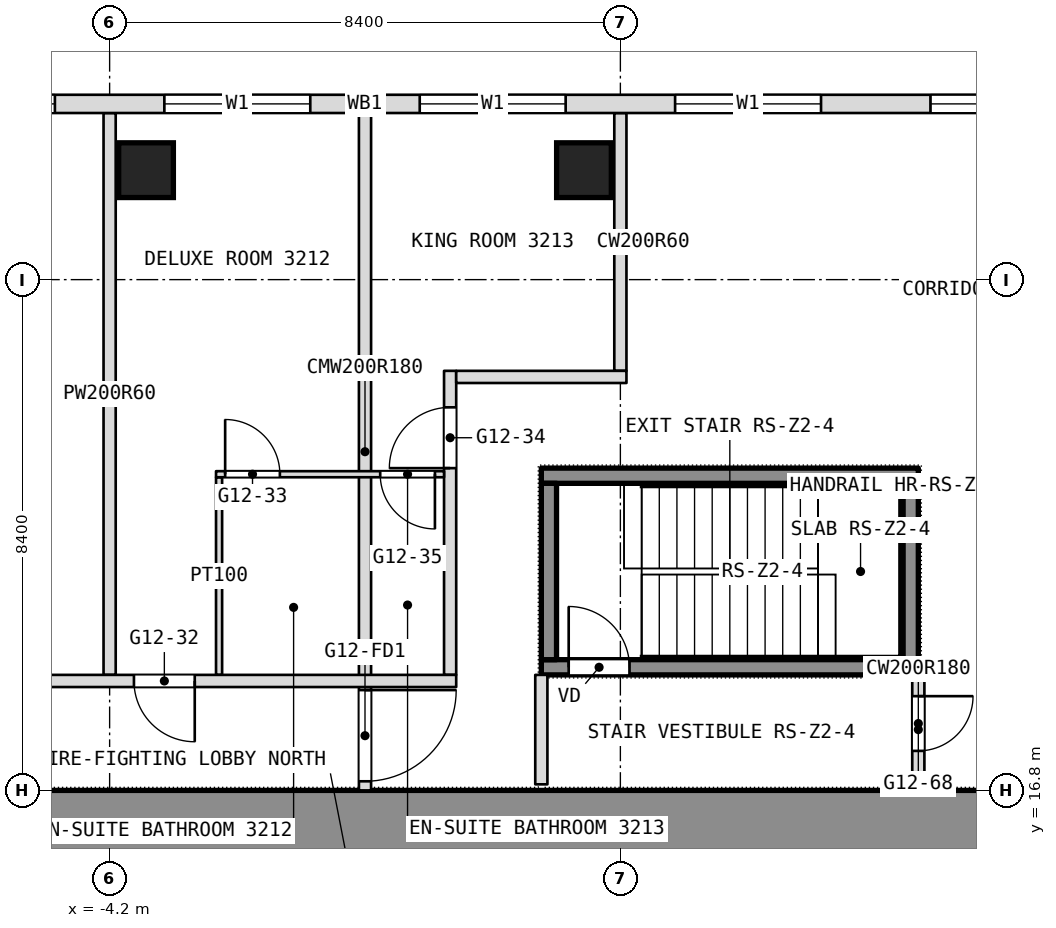
"""IFC4 building model, lengths in metres.
Left out: names, types, materials, properties, quantities, classifications, styles, units other than length and angle.
Written with IfcOpenShell. Run it as: python <this file> out.ifc"""

import sys

from ifc_helpers import new_model, si_unit, direction, frame, frame_2d, origin, origin_2d, place, context, subcontext, project, spatial, rectangle, extrude, element, fill, save


model = new_model("IFC4")
c1 = context("Model", 3, precision=1e-05, world=origin(), true_north=direction((0.0, 1.0)))
c2 = subcontext(c1, "Body", "Model", "MODEL_VIEW")
j1 = project(units=[si_unit("LENGTHUNIT", "METRE"), si_unit("PLANEANGLEUNIT", "RADIAN")], contexts=[c1])
p1 = place(None, origin())
s1 = spatial("IfcSite", under=j1, at=p1, CompositionType="ELEMENT")
p2 = place(p1, origin())
s2 = spatial("IfcBuilding", under=s1, at=p2, CompositionType="ELEMENT")
p3 = place(p2, frame((0.0, 0.0, 140.9)))
s3 = spatial("IfcBuildingStorey", under=s2, at=p3, CompositionType="ELEMENT", Elevation=140.9)
p4 = place(p3, frame((-11.1, 16.3, 0.0), z_axis=(0.0, 0.0, 1.0), x_axis=(1.0, 0.0, 0.0)))
e1 = element("IfcWall", 1, at=p4, inside=s3, PredefinedType="SHEAR", context=c2, shape_type="SweptSolid", body=[
    extrude(rectangle(XDim=22.2, YDim=1.0, at=frame_2d((11.1, 0.0))), origin(), (0.0, 0.0, 1.0), 3.6),
])
for number, where, z_axis, x_axis in (
    (2, (-3.601, 27.0, 0.0), (0.0, 0.0, 1.0), (1.0, 0.0, 0.0)),
    (3, (3.601, 27.0, 0.0), (0.0, 0.0, 1.0), (1.0, 0.0, 0.0)),
):
    element("IfcColumn", number, at=place(p3, frame(where, z_axis=z_axis, x_axis=x_axis)), inside=s3, PredefinedType="COLUMN", context=c2, shape_type="SweptSolid", body=[
        extrude(rectangle(XDim=0.9, YDim=0.9, at=origin_2d()), origin(), (0.0, 0.0, 1.0), 3.6),
    ])
p5 = place(p3, frame((9.1, 16.9, 0.0), z_axis=(0.0, 0.0, 1.0), x_axis=(0.0, 1.0, 0.0)))
e4 = element("IfcWall", 4, at=p5, inside=s3, PredefinedType="PARTITIONING", context=c2, shape_type="SweptSolid", body=[
    extrude(rectangle(XDim=1.8, YDim=0.2, at=frame_2d((0.9, 0.0))), origin(), (0.0, 0.0, 1.0), 3.34),
])
p6 = place(p5, frame((0.55, 0.0, 0.0)))
e5 = element("IfcOpeningElement", 5, at=p6, cuts=e4, PredefinedType="OPENING", context=c2, shape_type="SweptSolid", body=[
    extrude(rectangle(XDim=0.9, YDim=2.1, at=frame_2d((0.45, 1.05))), frame((0.0, 0.1, 0.0), z_axis=(0.0, -1.0, 0.0), x_axis=(1.0, 0.0, 0.0)), (0.0, 0.0, 1.0), 0.2),
])
p7 = place(p3, frame((4.2, 23.7, 0.0), z_axis=(0.0, 0.0, 1.0), x_axis=(0.0, 1.0, 0.0)))
e6 = element("IfcWall", 6, at=p7, inside=s3, PredefinedType="PARTITIONING", context=c2, shape_type="SweptSolid", body=[
    extrude(rectangle(XDim=4.24, YDim=0.2, at=frame_2d((2.12, 0.0))), origin(), (0.0, 0.0, 1.0), 3.34),
])
p8 = place(p3, frame((2.9, 16.9, 0.0), z_axis=(0.0, 0.0, 1.0), x_axis=(0.0, 1.0, 0.0)))
e7 = element("IfcWall", 7, at=p8, inside=s3, PredefinedType="PARTITIONING", context=c2, shape_type="SweptSolid", body=[
    extrude(rectangle(XDim=1.8, YDim=0.2, at=frame_2d((0.9, 0.0))), origin(), (0.0, 0.0, 1.0), 3.34),
])
p9 = place(p3, frame((1.4, 18.7, 0.0), z_axis=(0.0, 0.0, 1.0), x_axis=(0.0, 1.0, 0.0)))
e8 = element("IfcWall", 8, at=p9, inside=s3, PredefinedType="PARTITIONING", context=c2, shape_type="SweptSolid", body=[
    extrude(rectangle(XDim=5.0, YDim=0.2, at=frame_2d((2.5, 0.0))), origin(), (0.0, 0.0, 1.0), 3.34),
])
p10 = place(p9, frame((3.4, 0.0, 0.0)))
e9 = element("IfcOpeningElement", 9, at=p10, cuts=e8, PredefinedType="OPENING", context=c2, shape_type="SweptSolid", body=[
    extrude(rectangle(XDim=1.0, YDim=2.1, at=frame_2d((0.5, 1.05))), frame((0.0, 0.1, 0.0), z_axis=(0.0, -1.0, 0.0), x_axis=(1.0, 0.0, 0.0)), (0.0, 0.0, 1.0), 0.2),
])
p11 = place(p3, frame((0.0, 16.8, 0.0), z_axis=(0.0, 0.0, 1.0), x_axis=(0.0, 1.0, 0.0)))
e10 = element("IfcWall", 10, at=p11, inside=s3, PredefinedType="PARTITIONING", context=c2, shape_type="SweptSolid", body=[
    extrude(rectangle(XDim=11.14, YDim=0.2, at=frame_2d((5.57, 0.0))), origin(), (0.0, 0.0, 1.0), 3.34),
])
p12 = place(p11, frame((0.15, 0.0, 0.0)))
e11 = element("IfcOpeningElement", 11, at=p12, cuts=e10, PredefinedType="OPENING", context=c2, shape_type="SweptSolid", body=[
    extrude(rectangle(XDim=1.5, YDim=2.1, at=frame_2d((0.75, 1.05))), frame((0.0, 0.1, 0.0), z_axis=(0.0, -1.0, 0.0), x_axis=(1.0, 0.0, 0.0)), (0.0, 0.0, 1.0), 0.2),
])
p13 = place(p3, frame((-2.4, 18.7, 0.0), z_axis=(0.0, 0.0, 1.0), x_axis=(0.0, 1.0, 0.0)))
e12 = element("IfcWall", 12, at=p13, inside=s3, PredefinedType="PARTITIONING", context=c2, shape_type="SweptSolid", body=[
    extrude(rectangle(XDim=3.25, YDim=0.1, at=frame_2d((1.625, 0.0))), origin(), (0.0, 0.0, 1.0), 3.34),
])
p14 = place(p3, frame((-4.2, 18.7, 0.0), z_axis=(0.0, 0.0, 1.0), x_axis=(0.0, 1.0, 0.0)))
e13 = element("IfcWall", 13, at=p14, inside=s3, PredefinedType="PARTITIONING", context=c2, shape_type="SweptSolid", body=[
    extrude(rectangle(XDim=9.24, YDim=0.2, at=frame_2d((4.62, 0.0))), origin(), (0.0, 0.0, 1.0), 3.34),
])
p15 = place(p3, frame((-16.9, 18.6, 0.0), z_axis=(0.0, 0.0, 1.0), x_axis=(1.0, 0.0, 0.0)))
e14 = element("IfcWall", 14, at=p15, inside=s3, PredefinedType="PARTITIONING", context=c2, shape_type="SweptSolid", body=[
    extrude(rectangle(XDim=18.4, YDim=0.2, at=frame_2d((9.2, 0.0))), origin(), (0.0, 0.0, 1.0), 3.34),
])
p16 = place(p15, frame((0.5, 0.0, 0.0)))
e15 = element("IfcOpeningElement", 15, at=p16, cuts=e14, PredefinedType="OPENING", context=c2, shape_type="SweptSolid", body=[
    extrude(rectangle(XDim=1.0, YDim=2.1, at=frame_2d((0.5, 1.05))), frame((0.0, 0.1, 0.0), z_axis=(0.0, -1.0, 0.0), x_axis=(1.0, 0.0, 0.0)), (0.0, 0.0, 1.0), 0.2),
])
p17 = place(p15, frame((7.6, 0.0, 0.0)))
e16 = element("IfcOpeningElement", 16, at=p17, cuts=e14, PredefinedType="OPENING", context=c2, shape_type="SweptSolid", body=[
    extrude(rectangle(XDim=1.8, YDim=2.1, at=frame_2d((0.9, 1.05))), frame((0.0, 0.1, 0.0), z_axis=(0.0, -1.0, 0.0), x_axis=(1.0, 0.0, 0.0)), (0.0, 0.0, 1.0), 0.2),
])
p18 = place(p15, frame((13.1, 0.0, 0.0)))
e17 = element("IfcOpeningElement", 17, at=p18, cuts=e14, PredefinedType="OPENING", context=c2, shape_type="SweptSolid", body=[
    extrude(rectangle(XDim=1.0, YDim=2.1, at=frame_2d((0.5, 1.05))), frame((0.0, 0.1, 0.0), z_axis=(0.0, -1.0, 0.0), x_axis=(1.0, 0.0, 0.0)), (0.0, 0.0, 1.0), 0.2),
])
p19 = place(p3, frame((-2.45, 22.0, 0.0), z_axis=(0.0, 0.0, 1.0), x_axis=(1.0, 0.0, 0.0)))
e18 = element("IfcWall", 18, at=p19, inside=s3, PredefinedType="PARTITIONING", context=c2, shape_type="SweptSolid", body=[
    extrude(rectangle(XDim=3.75, YDim=0.1, at=frame_2d((1.875, 0.0))), origin(), (0.0, 0.0, 1.0), 3.34),
])
p20 = place(p19, frame((0.15, 0.0, 0.0)))
e19 = element("IfcOpeningElement", 19, at=p20, cuts=e18, PredefinedType="OPENING", context=c2, shape_type="SweptSolid", body=[
    extrude(rectangle(XDim=0.9, YDim=2.1, at=frame_2d((0.45, 1.05))), frame((0.0, 0.05, 0.0), z_axis=(0.0, -1.0, 0.0), x_axis=(1.0, 0.0, 0.0)), (0.0, 0.0, 1.0), 0.1),
])
p21 = place(p19, frame((2.7, 0.0, 0.0)))
e20 = element("IfcOpeningElement", 20, at=p21, cuts=e18, PredefinedType="OPENING", context=c2, shape_type="SweptSolid", body=[
    extrude(rectangle(XDim=0.9, YDim=2.1, at=frame_2d((0.45, 1.05))), frame((0.0, 0.05, 0.0), z_axis=(0.0, -1.0, 0.0), x_axis=(1.0, 0.0, 0.0)), (0.0, 0.0, 1.0), 0.1),
])
p22 = place(p3, frame((1.5, 23.6, 0.0), z_axis=(0.0, 0.0, 1.0), x_axis=(1.0, 0.0, 0.0)))
e21 = element("IfcWall", 21, at=p22, inside=s3, PredefinedType="PARTITIONING", context=c2, shape_type="SweptSolid", body=[
    extrude(rectangle(XDim=2.8, YDim=0.2, at=frame_2d((1.4, 0.0))), origin(), (0.0, 0.0, 1.0), 3.34),
])
p23 = place(p3, frame((21.306, 28.09, 0.0), z_axis=(0.0, 0.0, 1.0), x_axis=(-1.0, 0.0, 0.0)))
e22 = element("IfcWall", 22, at=p23, inside=s3, PredefinedType="NOTDEFINED", context=c2, shape_type="SweptSolid", body=[
    extrude(rectangle(XDim=42.612, YDim=0.3, at=frame_2d((21.306, 0.0))), origin(), (0.0, 0.0, 1.0), 3.6),
])
p24 = place(p23, frame((5.406, 0.0, 0.9)))
e23 = element("IfcOpeningElement", 23, at=p24, cuts=e22, PredefinedType="OPENING", context=c2, shape_type="SweptSolid", body=[
    extrude(rectangle(XDim=2.4, YDim=2.1, at=frame_2d((1.2, 1.05))), frame((0.0, 0.15, 0.0), z_axis=(0.0, -1.0, 0.0), x_axis=(1.0, 0.0, 0.0)), (0.0, 0.0, 1.0), 0.3),
])
p25 = place(p23, frame((9.606, 0.0, 0.9)))
e24 = element("IfcOpeningElement", 24, at=p25, cuts=e22, PredefinedType="OPENING", context=c2, shape_type="SweptSolid", body=[
    extrude(rectangle(XDim=2.4, YDim=2.1, at=frame_2d((1.2, 1.05))), frame((0.0, 0.15, 0.0), z_axis=(0.0, -1.0, 0.0), x_axis=(1.0, 0.0, 0.0)), (0.0, 0.0, 1.0), 0.3),
])
p26 = place(p23, frame((13.806, 0.0, 0.9)))
e25 = element("IfcOpeningElement", 25, at=p26, cuts=e22, PredefinedType="OPENING", context=c2, shape_type="SweptSolid", body=[
    extrude(rectangle(XDim=2.4, YDim=2.1, at=frame_2d((1.2, 1.05))), frame((0.0, 0.15, 0.0), z_axis=(0.0, -1.0, 0.0), x_axis=(1.0, 0.0, 0.0)), (0.0, 0.0, 1.0), 0.3),
])
p27 = place(p23, frame((18.006, 0.0, 0.9)))
e26 = element("IfcOpeningElement", 26, at=p27, cuts=e22, PredefinedType="OPENING", context=c2, shape_type="SweptSolid", body=[
    extrude(rectangle(XDim=2.4, YDim=2.1, at=frame_2d((1.2, 1.05))), frame((0.0, 0.15, 0.0), z_axis=(0.0, -1.0, 0.0), x_axis=(1.0, 0.0, 0.0)), (0.0, 0.0, 1.0), 0.3),
])
p28 = place(p23, frame((22.206, 0.0, 0.9)))
e27 = element("IfcOpeningElement", 27, at=p28, cuts=e22, PredefinedType="OPENING", context=c2, shape_type="SweptSolid", body=[
    extrude(rectangle(XDim=2.4, YDim=2.1, at=frame_2d((1.2, 1.05))), frame((0.0, 0.15, 0.0), z_axis=(0.0, -1.0, 0.0), x_axis=(1.0, 0.0, 0.0)), (0.0, 0.0, 1.0), 0.3),
])
p29 = place(p23, frame((26.406, 0.0, 0.9)))
e28 = element("IfcOpeningElement", 28, at=p29, cuts=e22, PredefinedType="OPENING", context=c2, shape_type="SweptSolid", body=[
    extrude(rectangle(XDim=2.4, YDim=2.1, at=frame_2d((1.2, 1.05))), frame((0.0, 0.15, 0.0), z_axis=(0.0, -1.0, 0.0), x_axis=(1.0, 0.0, 0.0)), (0.0, 0.0, 1.0), 0.3),
])
p30 = place(p23, frame((30.606, 0.0, 0.9)))
e29 = element("IfcOpeningElement", 29, at=p30, cuts=e22, PredefinedType="OPENING", context=c2, shape_type="SweptSolid", body=[
    extrude(rectangle(XDim=2.4, YDim=2.1, at=frame_2d((1.2, 1.05))), frame((0.0, 0.15, 0.0), z_axis=(0.0, -1.0, 0.0), x_axis=(1.0, 0.0, 0.0)), (0.0, 0.0, 1.0), 0.3),
])
p31 = place(p23, frame((34.806, 0.0, 0.9)))
e30 = element("IfcOpeningElement", 30, at=p31, cuts=e22, PredefinedType="OPENING", context=c2, shape_type="SweptSolid", body=[
    extrude(rectangle(XDim=2.4, YDim=2.1, at=frame_2d((1.2, 1.05))), frame((0.0, 0.15, 0.0), z_axis=(0.0, -1.0, 0.0), x_axis=(1.0, 0.0, 0.0)), (0.0, 0.0, 1.0), 0.3),
])
p32 = place(p3, frame((2.9, 18.825, 0.1), z_axis=(0.0, 0.0, 1.0), x_axis=(1.0, 0.0, 0.0)))
e31 = element("IfcWall", 31, at=p32, inside=s3, PredefinedType="SHEAR", context=c2, shape_type="SweptSolid", body=[
    extrude(rectangle(XDim=6.2, YDim=0.25, at=frame_2d((3.1, 0.0))), origin(), (0.0, 0.0, 1.0), 3.6),
])
p33 = place(p32, frame((0.45, 0.0, 0.0)))
e32 = element("IfcOpeningElement", 32, at=p33, cuts=e31, PredefinedType="OPENING", context=c2, shape_type="SweptSolid", body=[
    extrude(rectangle(XDim=1.0, YDim=2.1, at=frame_2d((0.5, 1.05))), frame((0.0, 0.125, 0.0), z_axis=(0.0, -1.0, 0.0), x_axis=(1.0, 0.0, 0.0)), (0.0, 0.0, 1.0), 0.25),
])
p34 = place(p3, frame((2.9, 21.975, 0.1), z_axis=(0.0, 0.0, 1.0), x_axis=(1.0, 0.0, 0.0)))
e33 = element("IfcWall", 33, at=p34, inside=s3, PredefinedType="SHEAR", context=c2, shape_type="SweptSolid", body=[
    extrude(rectangle(XDim=6.2, YDim=0.25, at=frame_2d((3.1, 0.0))), origin(), (0.0, 0.0, 1.0), 3.6),
])
for number, where, z_axis, x_axis in (
    (34, (3.025, 18.95, 0.1), (0.0, 0.0, 1.0), (0.0, 1.0, 0.0)),
    (35, (8.975, 18.95, 0.1), (0.0, 0.0, 1.0), (0.0, 1.0, 0.0)),
):
    element("IfcWall", number, at=place(p3, frame(where, z_axis=z_axis, x_axis=x_axis)), inside=s3, PredefinedType="SHEAR", context=c2, shape_type="SweptSolid", body=[
        extrude(rectangle(XDim=2.9, YDim=0.25, at=frame_2d((1.45, 0.0))), origin(), (0.0, 0.0, 1.0), 3.6),
    ])
p35 = place(p6, origin())
e36 = element("IfcDoor", 36, at=p35, inside=s3, OperationType="SINGLE_SWING_RIGHT", PredefinedType="DOOR", context=c2, shape_type="SweptSolid", body=[
    extrude(rectangle(XDim=0.9, YDim=2.1, at=frame_2d((0.45, 1.05))), frame((0.0, 0.025, 0.0), z_axis=(0.0, -1.0, 0.0), x_axis=(1.0, 0.0, 0.0)), (0.0, 0.0, 1.0), 0.05),
])
fill(e5, e36)
p36 = place(p10, origin())
e37 = element("IfcDoor", 37, at=p36, inside=s3, OperationType="SINGLE_SWING_RIGHT", PredefinedType="DOOR", context=c2, shape_type="SweptSolid", body=[
    extrude(rectangle(XDim=1.0, YDim=2.1, at=frame_2d((0.5, 1.05))), frame((0.0, 0.025, 0.0), z_axis=(0.0, -1.0, 0.0), x_axis=(1.0, 0.0, 0.0)), (0.0, 0.0, 1.0), 0.05),
])
fill(e9, e37)
p37 = place(p18, origin())
e38 = element("IfcDoor", 38, at=p37, inside=s3, OperationType="SINGLE_SWING_LEFT", PredefinedType="DOOR", context=c2, shape_type="SweptSolid", body=[
    extrude(rectangle(XDim=1.0, YDim=2.1, at=frame_2d((0.5, 1.05))), frame((0.0, 0.025, 0.0), z_axis=(0.0, -1.0, 0.0), x_axis=(1.0, 0.0, 0.0)), (0.0, 0.0, 1.0), 0.05),
])
fill(e17, e38)
p38 = place(p20, origin())
e39 = element("IfcDoor", 39, at=p38, inside=s3, OperationType="SINGLE_SWING_RIGHT", PredefinedType="DOOR", context=c2, shape_type="SweptSolid", body=[
    extrude(rectangle(XDim=0.9, YDim=2.1, at=frame_2d((0.45, 1.05))), frame((0.0, 0.025, 0.0), z_axis=(0.0, -1.0, 0.0), x_axis=(1.0, 0.0, 0.0)), (0.0, 0.0, 1.0), 0.05),
])
fill(e19, e39)
p39 = place(p21, origin())
e40 = element("IfcDoor", 40, at=p39, inside=s3, OperationType="SINGLE_SWING_LEFT", PredefinedType="DOOR", context=c2, shape_type="SweptSolid", body=[
    extrude(rectangle(XDim=0.9, YDim=2.1, at=frame_2d((0.45, 1.05))), frame((0.0, 0.025, 0.0), z_axis=(0.0, -1.0, 0.0), x_axis=(1.0, 0.0, 0.0)), (0.0, 0.0, 1.0), 0.05),
])
fill(e20, e40)
p40 = place(p25, origin())
e41 = element("IfcWindow", 41, at=p40, inside=s3, PartitioningType="SINGLE_PANEL", PredefinedType="WINDOW", context=c2, shape_type="SweptSolid", body=[
    extrude(rectangle(XDim=2.4, YDim=2.1, at=frame_2d((1.2, 1.05))), frame((0.0, 0.03, 0.0), z_axis=(0.0, -1.0, 0.0), x_axis=(1.0, 0.0, 0.0)), (0.0, 0.0, 1.0), 0.06),
])
fill(e24, e41)
p41 = place(p26, origin())
e42 = element("IfcWindow", 42, at=p41, inside=s3, PartitioningType="SINGLE_PANEL", PredefinedType="WINDOW", context=c2, shape_type="SweptSolid", body=[
    extrude(rectangle(XDim=2.4, YDim=2.1, at=frame_2d((1.2, 1.05))), frame((0.0, 0.03, 0.0), z_axis=(0.0, -1.0, 0.0), x_axis=(1.0, 0.0, 0.0)), (0.0, 0.0, 1.0), 0.06),
])
fill(e25, e42)
p42 = place(p27, origin())
e43 = element("IfcWindow", 43, at=p42, inside=s3, PartitioningType="SINGLE_PANEL", PredefinedType="WINDOW", context=c2, shape_type="SweptSolid", body=[
    extrude(rectangle(XDim=2.4, YDim=2.1, at=frame_2d((1.2, 1.05))), frame((0.0, 0.03, 0.0), z_axis=(0.0, -1.0, 0.0), x_axis=(1.0, 0.0, 0.0)), (0.0, 0.0, 1.0), 0.06),
])
fill(e26, e43)
p43 = place(p28, origin())
e44 = element("IfcWindow", 44, at=p43, inside=s3, PartitioningType="SINGLE_PANEL", PredefinedType="WINDOW", context=c2, shape_type="SweptSolid", body=[
    extrude(rectangle(XDim=2.4, YDim=2.1, at=frame_2d((1.2, 1.05))), frame((0.0, 0.03, 0.0), z_axis=(0.0, -1.0, 0.0), x_axis=(1.0, 0.0, 0.0)), (0.0, 0.0, 1.0), 0.06),
])
fill(e27, e44)
p44 = place(p29, origin())
e45 = element("IfcWindow", 45, at=p44, inside=s3, PartitioningType="SINGLE_PANEL", PredefinedType="WINDOW", context=c2, shape_type="SweptSolid", body=[
    extrude(rectangle(XDim=2.4, YDim=2.1, at=frame_2d((1.2, 1.05))), frame((0.0, 0.03, 0.0), z_axis=(0.0, -1.0, 0.0), x_axis=(1.0, 0.0, 0.0)), (0.0, 0.0, 1.0), 0.06),
])
fill(e28, e45)
p45 = place(p33, origin())
e46 = element("IfcDoor", 46, at=p45, inside=s3, OperationType="SINGLE_SWING_LEFT", PredefinedType="DOOR", context=c2, shape_type="SweptSolid", body=[
    extrude(rectangle(XDim=1.0, YDim=2.1, at=frame_2d((0.5, 1.05))), frame((0.0, 0.025, 0.0), z_axis=(0.0, -1.0, 0.0), x_axis=(1.0, 0.0, 0.0)), (0.0, 0.0, 1.0), 0.05),
])
fill(e32, e46)
p46 = place(p12, origin())
e47 = element("IfcDoor", 47, at=p46, inside=s3, OperationType="DOUBLE_DOOR_DOUBLE_SWING", PredefinedType="DOOR", context=c2, shape_type="SweptSolid", body=[
    extrude(rectangle(XDim=1.5, YDim=2.1, at=frame_2d((0.75, 1.05))), frame((0.0, 0.025, 0.0), z_axis=(0.0, -1.0, 0.0), x_axis=(1.0, 0.0, 0.0)), (0.0, 0.0, 1.0), 0.05),
])
fill(e11, e47)
save(model, sys.argv[1])
